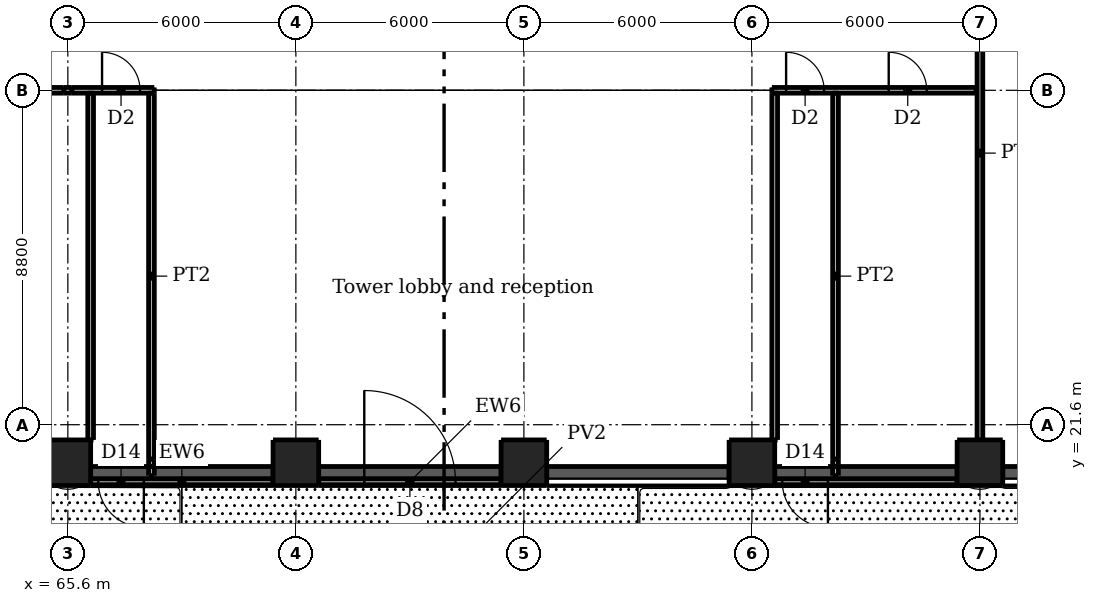
"""IFC4 building model, lengths in metres.
Left out: names, types, materials, properties, quantities, classifications, styles, units other than length and angle.
Written with IfcOpenShell. Run it as: python <this file> out.ifc"""

import sys

from ifc_helpers import new_model, si_unit, direction, frame, frame_2d, origin, origin_2d, place, context, subcontext, project, spatial, rectangle, extrude, element, fill, save


model = new_model("IFC4")
c1 = context("Model", 3, precision=1e-05, world=origin(), true_north=direction((0.0, 1.0)))
c2 = subcontext(c1, "Body", "Model", "MODEL_VIEW")
j1 = project(units=[si_unit("LENGTHUNIT", "METRE"), si_unit("PLANEANGLEUNIT", "RADIAN")], contexts=[c1])
p1 = place(None, origin())
s1 = spatial("IfcSite", under=j1, at=p1, CompositionType="ELEMENT")
p2 = place(p1, origin())
s2 = spatial("IfcBuilding", under=s1, at=p2, CompositionType="ELEMENT")
p3 = place(p2, origin())
s3 = spatial("IfcBuildingStorey", under=s2, at=p3, CompositionType="ELEMENT", Elevation=0.0)
for number, where, z_axis, x_axis in (
    (1, (66.2, 20.25, -2.5), (0.0, 0.0, 1.0), (1.0, 0.0, 0.0)),
    (2, (72.2, 20.25, -2.5), (0.0, 0.0, 1.0), (1.0, 0.0, 0.0)),
    (3, (78.2, 20.25, -2.5), (0.0, 0.0, 1.0), (1.0, 0.0, 0.0)),
    (4, (84.2, 20.25, -2.5), (0.0, 0.0, 1.0), (1.0, 0.0, 0.0)),
):
    element("IfcWall", number, at=place(p3, frame(where, z_axis=z_axis, x_axis=x_axis)), inside=s3, PredefinedType="SOLIDWALL", context=c2, shape_type="SweptSolid", body=[
        extrude(rectangle(XDim=4.8, YDim=0.5, at=frame_2d((2.4, 0.0))), origin(), (0.0, 0.0, 1.0), 2.2),
    ])
p4 = place(p3, frame((90.2, 20.25, -2.5), z_axis=(0.0, 0.0, 1.0), x_axis=(1.0, 0.0, 0.0)))
e5 = element("IfcWall", 5, at=p4, inside=s3, PredefinedType="SOLIDWALL", context=c2, shape_type="SweptSolid", body=[
    extrude(rectangle(XDim=9.8, YDim=0.5, at=frame_2d((4.9, 0.0))), origin(), (0.0, 0.0, 1.0), 2.2),
])
for number, where, z_axis, x_axis in (
    (6, (65.6, 20.6, -2.5), (0.0, 0.0, 1.0), (1.0, 0.0, 0.0)),
    (7, (71.6, 20.6, -2.5), (0.0, 0.0, 1.0), (1.0, 0.0, 0.0)),
    (8, (77.6, 20.6, -2.5), (0.0, 0.0, 1.0), (1.0, 0.0, 0.0)),
    (9, (83.6, 20.6, -2.5), (0.0, 0.0, 1.0), (1.0, 0.0, 0.0)),
    (10, (89.6, 20.6, -2.5), (0.0, 0.0, 1.0), (1.0, 0.0, 0.0)),
):
    element("IfcColumn", number, at=place(p3, frame(where, z_axis=z_axis, x_axis=x_axis)), inside=s3, PredefinedType="COLUMN", context=c2, shape_type="SweptSolid", body=[
        extrude(rectangle(XDim=1.2, YDim=1.2, at=origin_2d()), origin(), (0.0, 0.0, 1.0), 7.7),
    ])
p5 = place(p3, frame((71.0, 20.1, 0.0), z_axis=(0.0, 0.0, 1.0), x_axis=(-1.0, 0.0, 0.0)))
e11 = element("IfcWall", 11, at=p5, inside=s3, PredefinedType="SOLIDWALL", context=c2, shape_type="SweptSolid", body=[
    extrude(rectangle(XDim=4.8, YDim=0.16, at=frame_2d((2.4, 0.0))), origin(), (0.0, 0.0, 1.0), 5.2),
])
p6 = place(p5, frame((3.4, 0.0, 0.0)))
e12 = element("IfcOpeningElement", 12, at=p6, cuts=e11, PredefinedType="OPENING", context=c2, shape_type="SweptSolid", body=[
    extrude(rectangle(XDim=1.2, YDim=2.1, at=frame_2d((0.6, 1.05))), frame((0.0, 0.09, 0.0), z_axis=(0.0, -1.0, 0.0), x_axis=(1.0, 0.0, 0.0)), (0.0, 0.0, 1.0), 0.18),
])
p7 = place(p3, frame((72.2, 20.1, 0.0), z_axis=(0.0, 0.0, 1.0), x_axis=(1.0, 0.0, 0.0)))
e13 = element("IfcWall", 13, at=p7, inside=s3, PredefinedType="SOLIDWALL", context=c2, shape_type="SweptSolid", body=[
    extrude(rectangle(XDim=4.8, YDim=0.16, at=frame_2d((2.4, 0.0))), origin(), (0.0, 0.0, 1.0), 5.2),
])
p8 = place(p7, frame((1.2, 0.0, 0.0)))
e14 = element("IfcOpeningElement", 14, at=p8, cuts=e13, PredefinedType="OPENING", context=c2, shape_type="SweptSolid", body=[
    extrude(rectangle(XDim=2.4, YDim=2.4, at=frame_2d((1.2, 1.2))), frame((0.0, 0.09, 0.0), z_axis=(0.0, -1.0, 0.0), x_axis=(1.0, 0.0, 0.0)), (0.0, 0.0, 1.0), 0.18),
])
p9 = place(p3, frame((89.0, 20.1, 0.0), z_axis=(0.0, 0.0, 1.0), x_axis=(-1.0, 0.0, 0.0)))
e15 = element("IfcWall", 15, at=p9, inside=s3, PredefinedType="SOLIDWALL", context=c2, shape_type="SweptSolid", body=[
    extrude(rectangle(XDim=4.8, YDim=0.16, at=frame_2d((2.4, 0.0))), origin(), (0.0, 0.0, 1.0), 5.2),
])
p10 = place(p9, frame((3.4, 0.0, 0.0)))
e16 = element("IfcOpeningElement", 16, at=p10, cuts=e15, PredefinedType="OPENING", context=c2, shape_type="SweptSolid", body=[
    extrude(rectangle(XDim=1.2, YDim=2.1, at=frame_2d((0.6, 1.05))), frame((0.0, 0.09, 0.0), z_axis=(0.0, -1.0, 0.0), x_axis=(1.0, 0.0, 0.0)), (0.0, 0.0, 1.0), 0.18),
])
p11 = place(p3, frame((59.705, 30.4, 0.0), z_axis=(0.0, 0.0, 1.0), x_axis=(1.0, 0.0, 0.0)))
e17 = element("IfcWall", 17, at=p11, inside=s3, PredefinedType="PARTITIONING", context=c2, shape_type="SweptSolid", body=[
    extrude(rectangle(XDim=5.789, YDim=0.15, at=frame_2d((2.895, 0.0))), origin(), (0.0, 0.0, 1.0), 5.2),
])
p12 = place(p11, frame((2.695, 0.0, 0.0)))
e18 = element("IfcOpeningElement", 18, at=p12, cuts=e17, PredefinedType="OPENING", context=c2, shape_type="SweptSolid", body=[
    extrude(rectangle(XDim=1.0, YDim=2.1, at=frame_2d((0.5, 1.05))), frame((0.0, 0.085, 0.0), z_axis=(0.0, -1.0, 0.0), x_axis=(1.0, 0.0, 0.0)), (0.0, 0.0, 1.0), 0.17),
])
p13 = place(p3, frame((65.495, 30.4, 0.0), z_axis=(0.0, 0.0, 1.0), x_axis=(1.0, 0.0, 0.0)))
e19 = element("IfcWall", 19, at=p13, inside=s3, PredefinedType="PARTITIONING", context=c2, shape_type="SweptSolid", body=[
    extrude(rectangle(XDim=0.211, YDim=0.15, at=frame_2d((0.105, 0.0))), origin(), (0.0, 0.0, 1.0), 4.66),
])
p14 = place(p3, frame((65.705, 30.4, 0.0), z_axis=(0.0, 0.0, 1.0), x_axis=(1.0, 0.0, 0.0)))
e20 = element("IfcWall", 20, at=p14, inside=s3, PredefinedType="PARTITIONING", context=c2, shape_type="SweptSolid", body=[
    extrude(rectangle(XDim=2.17, YDim=0.15, at=frame_2d((1.085, 0.0))), origin(), (0.0, 0.0, 1.0), 5.2),
])
p15 = place(p14, frame((0.795, 0.0, 0.0)))
e21 = element("IfcOpeningElement", 21, at=p15, cuts=e20, PredefinedType="OPENING", context=c2, shape_type="SweptSolid", body=[
    extrude(rectangle(XDim=1.0, YDim=2.1, at=frame_2d((0.5, 1.05))), frame((0.0, 0.085, 0.0), z_axis=(0.0, -1.0, 0.0), x_axis=(1.0, 0.0, 0.0)), (0.0, 0.0, 1.0), 0.17),
])
p16 = place(p3, frame((84.125, 30.4, 0.0), z_axis=(0.0, 0.0, 1.0), x_axis=(1.0, 0.0, 0.0)))
e22 = element("IfcWall", 22, at=p16, inside=s3, PredefinedType="PARTITIONING", context=c2, shape_type="SweptSolid", body=[
    extrude(rectangle(XDim=5.37, YDim=0.15, at=frame_2d((2.685, 0.0))), origin(), (0.0, 0.0, 1.0), 5.2),
])
p17 = place(p16, frame((0.375, 0.0, 0.0)))
e23 = element("IfcOpeningElement", 23, at=p17, cuts=e22, PredefinedType="OPENING", context=c2, shape_type="SweptSolid", body=[
    extrude(rectangle(XDim=1.0, YDim=2.1, at=frame_2d((0.5, 1.05))), frame((0.0, 0.085, 0.0), z_axis=(0.0, -1.0, 0.0), x_axis=(1.0, 0.0, 0.0)), (0.0, 0.0, 1.0), 0.17),
])
p18 = place(p16, frame((3.075, 0.0, 0.0)))
e24 = element("IfcOpeningElement", 24, at=p18, cuts=e22, PredefinedType="OPENING", context=c2, shape_type="SweptSolid", body=[
    extrude(rectangle(XDim=1.0, YDim=2.1, at=frame_2d((0.5, 1.05))), frame((0.0, 0.085, 0.0), z_axis=(0.0, -1.0, 0.0), x_axis=(1.0, 0.0, 0.0)), (0.0, 0.0, 1.0), 0.17),
])
p19 = place(p3, frame((66.2, 21.2, 0.0), z_axis=(0.0, 0.0, 1.0), x_axis=(0.0, 1.0, 0.0)))
e25 = element("IfcWall", 25, at=p19, inside=s3, PredefinedType="PARTITIONING", context=c2, shape_type="SweptSolid", body=[
    extrude(rectangle(XDim=9.125, YDim=0.15, at=frame_2d((4.562, 0.0))), origin(), (0.0, 0.0, 1.0), 5.2),
])
p20 = place(p3, frame((67.8, 20.26, 0.0), z_axis=(0.0, 0.0, 1.0), x_axis=(0.0, 1.0, 0.0)))
e26 = element("IfcWall", 26, at=p20, inside=s3, PredefinedType="PARTITIONING", context=c2, shape_type="SweptSolid", body=[
    extrude(rectangle(XDim=0.245, YDim=0.15, at=frame_2d((0.123, 0.0))), origin(), (0.0, 0.0, 1.0), 5.2),
])
p21 = place(p3, frame((67.8, 20.505, 0.0), z_axis=(0.0, 0.0, 1.0), x_axis=(0.0, 1.0, 0.0)))
e27 = element("IfcWall", 27, at=p21, inside=s3, PredefinedType="PARTITIONING", context=c2, shape_type="SweptSolid", body=[
    extrude(rectangle(XDim=0.19, YDim=0.15, at=frame_2d((0.095, 0.0))), origin(), (0.0, 0.0, 1.0), 4.747),
])
p22 = place(p3, frame((67.8, 20.695, 0.0), z_axis=(0.0, 0.0, 1.0), x_axis=(0.0, 1.0, 0.0)))
e28 = element("IfcWall", 28, at=p22, inside=s3, PredefinedType="PARTITIONING", context=c2, shape_type="SweptSolid", body=[
    extrude(rectangle(XDim=9.63, YDim=0.15, at=frame_2d((4.815, 0.0))), origin(), (0.0, 0.0, 1.0), 5.2),
])
p23 = place(p3, frame((84.2, 21.2, 0.0), z_axis=(0.0, 0.0, 1.0), x_axis=(0.0, 1.0, 0.0)))
e29 = element("IfcWall", 29, at=p23, inside=s3, PredefinedType="PARTITIONING", context=c2, shape_type="SweptSolid", body=[
    extrude(rectangle(XDim=9.125, YDim=0.15, at=frame_2d((4.562, 0.0))), origin(), (0.0, 0.0, 1.0), 5.2),
])
p24 = place(p3, frame((85.8, 20.26, 0.0), z_axis=(0.0, 0.0, 1.0), x_axis=(0.0, 1.0, 0.0)))
e30 = element("IfcWall", 30, at=p24, inside=s3, PredefinedType="PARTITIONING", context=c2, shape_type="SweptSolid", body=[
    extrude(rectangle(XDim=0.245, YDim=0.15, at=frame_2d((0.123, 0.0))), origin(), (0.0, 0.0, 1.0), 5.2),
])
p25 = place(p3, frame((85.8, 20.505, 0.0), z_axis=(0.0, 0.0, 1.0), x_axis=(0.0, 1.0, 0.0)))
e31 = element("IfcWall", 31, at=p25, inside=s3, PredefinedType="PARTITIONING", context=c2, shape_type="SweptSolid", body=[
    extrude(rectangle(XDim=0.19, YDim=0.15, at=frame_2d((0.095, 0.0))), origin(), (0.0, 0.0, 1.0), 4.747),
])
p26 = place(p3, frame((85.8, 20.695, 0.0), z_axis=(0.0, 0.0, 1.0), x_axis=(0.0, 1.0, 0.0)))
e32 = element("IfcWall", 32, at=p26, inside=s3, PredefinedType="PARTITIONING", context=c2, shape_type="SweptSolid", body=[
    extrude(rectangle(XDim=9.63, YDim=0.15, at=frame_2d((4.815, 0.0))), origin(), (0.0, 0.0, 1.0), 5.2),
])
p27 = place(p3, frame((89.6, 21.2, 0.0), z_axis=(0.0, 0.0, 1.0), x_axis=(0.0, 1.0, 0.0)))
e33 = element("IfcWall", 33, at=p27, inside=s3, PredefinedType="PARTITIONING", context=c2, shape_type="SweptSolid", body=[
    extrude(rectangle(XDim=15.095, YDim=0.15, at=frame_2d((7.547, 0.0))), origin(), (0.0, 0.0, 1.0), 4.66),
])
p28 = place(p6, origin())
e34 = element("IfcDoor", 34, at=p28, inside=s3, OperationType="SINGLE_SWING_LEFT", PredefinedType="DOOR", context=c2, shape_type="SweptSolid", body=[
    extrude(rectangle(XDim=1.2, YDim=2.1, at=frame_2d((0.6, 1.05))), frame((0.0, 0.025, 0.0), z_axis=(0.0, -1.0, 0.0), x_axis=(1.0, 0.0, 0.0)), (0.0, 0.0, 1.0), 0.05),
])
fill(e12, e34)
p29 = place(p8, origin())
e35 = element("IfcDoor", 35, at=p29, inside=s3, OperationType="DOUBLE_DOOR_SINGLE_SWING", PredefinedType="DOOR", context=c2, shape_type="SweptSolid", body=[
    extrude(rectangle(XDim=2.4, YDim=2.4, at=frame_2d((1.2, 1.2))), frame((0.0, 0.025, 0.0), z_axis=(0.0, -1.0, 0.0), x_axis=(1.0, 0.0, 0.0)), (0.0, 0.0, 1.0), 0.05),
])
fill(e14, e35)
p30 = place(p10, origin())
e36 = element("IfcDoor", 36, at=p30, inside=s3, OperationType="SINGLE_SWING_LEFT", PredefinedType="DOOR", context=c2, shape_type="SweptSolid", body=[
    extrude(rectangle(XDim=1.2, YDim=2.1, at=frame_2d((0.6, 1.05))), frame((0.0, 0.025, 0.0), z_axis=(0.0, -1.0, 0.0), x_axis=(1.0, 0.0, 0.0)), (0.0, 0.0, 1.0), 0.05),
])
fill(e16, e36)
p31 = place(p15, origin())
e37 = element("IfcDoor", 37, at=p31, inside=s3, OperationType="SINGLE_SWING_LEFT", PredefinedType="DOOR", context=c2, shape_type="SweptSolid", body=[
    extrude(rectangle(XDim=1.0, YDim=2.1, at=frame_2d((0.5, 1.05))), frame((0.0, 0.025, 0.0), z_axis=(0.0, -1.0, 0.0), x_axis=(1.0, 0.0, 0.0)), (0.0, 0.0, 1.0), 0.05),
])
fill(e21, e37)
p32 = place(p17, origin())
e38 = element("IfcDoor", 38, at=p32, inside=s3, OperationType="SINGLE_SWING_LEFT", PredefinedType="DOOR", context=c2, shape_type="SweptSolid", body=[
    extrude(rectangle(XDim=1.0, YDim=2.1, at=frame_2d((0.5, 1.05))), frame((0.0, 0.025, 0.0), z_axis=(0.0, -1.0, 0.0), x_axis=(1.0, 0.0, 0.0)), (0.0, 0.0, 1.0), 0.05),
])
fill(e23, e38)
p33 = place(p18, origin())
e39 = element("IfcDoor", 39, at=p33, inside=s3, OperationType="SINGLE_SWING_LEFT", PredefinedType="DOOR", context=c2, shape_type="SweptSolid", body=[
    extrude(rectangle(XDim=1.0, YDim=2.1, at=frame_2d((0.5, 1.05))), frame((0.0, 0.025, 0.0), z_axis=(0.0, -1.0, 0.0), x_axis=(1.0, 0.0, 0.0)), (0.0, 0.0, 1.0), 0.05),
])
fill(e24, e39)
save(model, sys.argv[1])
